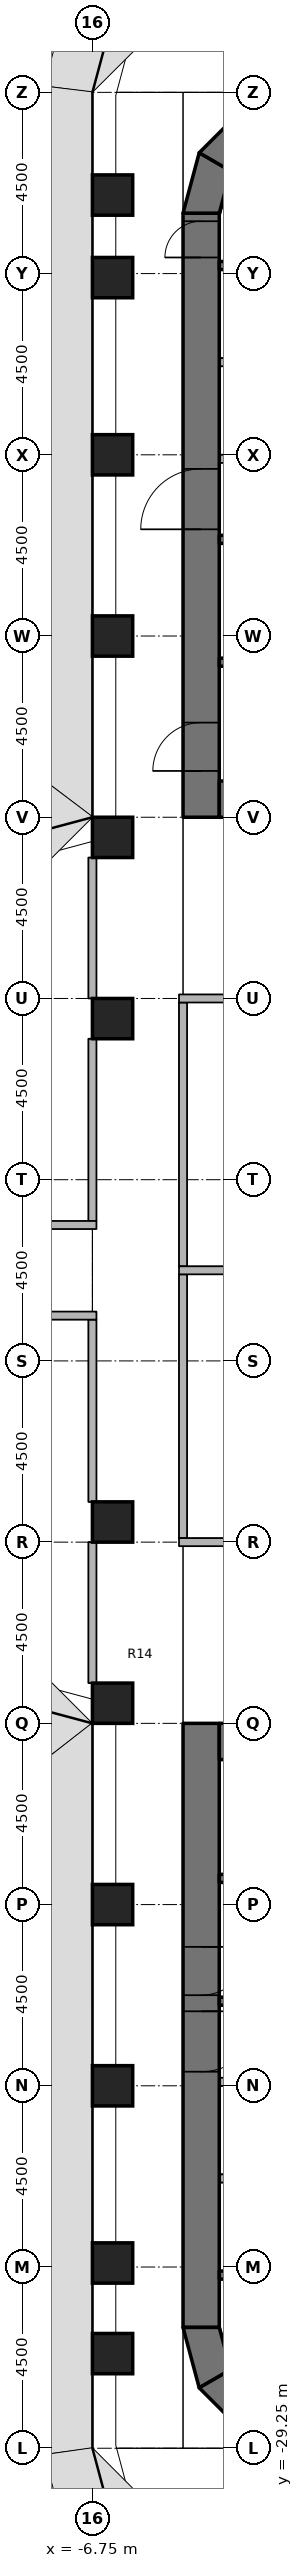
"""IFC4 building model, lengths in metres.
Left out: names, types, materials, properties, quantities, classifications, styles, units other than length and angle.
Written with IfcOpenShell. Run it as: python <this file> out.ifc"""

import sys

from ifc_helpers import new_model, si_unit, direction, frame, frame_2d, origin, origin_2d, place, context, subcontext, project, spatial, polyline, rectangle, outline, extrude, element, fill, save


model = new_model("IFC4")
c1 = context("Model", 3, precision=1e-05, world=origin(), true_north=direction((0.0, 1.0)))
c2 = subcontext(c1, "Body", "Model", "MODEL_VIEW")
j1 = project(units=[si_unit("LENGTHUNIT", "METRE"), si_unit("PLANEANGLEUNIT", "RADIAN")], contexts=[c1])
p1 = place(None, origin())
s1 = spatial("IfcSite", under=j1, at=p1, CompositionType="ELEMENT")
p2 = place(p1, origin())
s2 = spatial("IfcBuilding", under=s1, at=p2, CompositionType="ELEMENT")
p3 = place(p2, frame((0.0, 0.0, 43.8)))
s3 = spatial("IfcBuildingStorey", under=s2, at=p3, CompositionType="ELEMENT", Elevation=43.8)
for number, where, z_axis, x_axis in (
    (1, (-6.25, -26.9, 0.0), (0.0, 0.0, 1.0), (1.0, 0.0, 0.0)),
    (2, (-6.25, -24.65, 0.0), (0.0, 0.0, 1.0), (1.0, 0.0, 0.0)),
    (3, (-6.25, -20.25, 0.0), (0.0, 0.0, 1.0), (1.0, 0.0, 0.0)),
    (4, (-6.25, -15.75, 0.0), (0.0, 0.0, 1.0), (1.0, 0.0, 0.0)),
    (5, (-6.25, -10.75, 0.0), (0.0, 0.0, 1.0), (1.0, 0.0, 0.0)),
    (6, (-6.25, -6.25, 0.0), (0.0, 0.0, 1.0), (1.0, 0.0, 0.0)),
    (7, (-6.25, 6.25, 0.0), (0.0, 0.0, 1.0), (1.0, 0.0, 0.0)),
    (8, (-6.25, 10.75, 0.0), (0.0, 0.0, 1.0), (1.0, 0.0, 0.0)),
    (9, (-6.25, 15.75, 0.0), (0.0, 0.0, 1.0), (1.0, 0.0, 0.0)),
    (10, (-6.25, 20.25, 0.0), (0.0, 0.0, 1.0), (1.0, 0.0, 0.0)),
    (11, (-6.25, 24.65, 0.0), (0.0, 0.0, 1.0), (1.0, 0.0, 0.0)),
    (12, (-6.25, 26.7, 0.0), (0.0, 0.0, 1.0), (1.0, 0.0, 0.0)),
):
    element("IfcColumn", number, at=place(p3, frame(where, z_axis=z_axis, x_axis=x_axis)), inside=s3, PredefinedType="COLUMN", context=c2, shape_type="SweptSolid", body=[
        extrude(rectangle(XDim=1.0, YDim=1.0, at=origin_2d()), origin(), (0.0, 0.0, 1.0), 4.05),
    ])
p4 = place(p3, frame((-4.05, 11.25, 0.0), z_axis=(0.0, 0.0, 1.0), x_axis=(0.0, 1.0, 0.0)))
e13 = element("IfcWall", 13, at=p4, inside=s3, PredefinedType="SHEAR", context=c2, shape_type="SweptSolid", body=[
    extrude(rectangle(XDim=15.0, YDim=0.9, at=frame_2d((7.5, 0.0))), origin(), (0.0, 0.0, 1.0), 4.2),
])
p5 = place(p4, frame((7.15, 0.0, 0.0)))
e14 = element("IfcOpeningElement", 14, at=p5, cuts=e13, PredefinedType="OPENING", context=c2, shape_type="SweptSolid", body=[
    extrude(rectangle(XDim=1.5, YDim=2.3, at=frame_2d((0.75, 1.15))), frame((0.0, 0.46, 0.0), z_axis=(0.0, -1.0, 0.0), x_axis=(1.0, 0.0, 0.0)), (0.0, 0.0, 1.0), 0.92),
])
p6 = place(p4, frame((13.9, 0.0, 0.0)))
e15 = element("IfcOpeningElement", 15, at=p6, cuts=e13, PredefinedType="OPENING", context=c2, shape_type="SweptSolid", body=[
    extrude(rectangle(XDim=0.9, YDim=2.1, at=frame_2d((0.45, 1.05))), frame((0.0, 0.46, 0.0), z_axis=(0.0, -1.0, 0.0), x_axis=(1.0, 0.0, 0.0)), (0.0, 0.0, 1.0), 0.92),
])
p7 = place(p4, frame((1.15, 0.0, 0.0)))
e16 = element("IfcOpeningElement", 16, at=p7, cuts=e13, PredefinedType="OPENING", context=c2, shape_type="SweptSolid", body=[
    extrude(rectangle(XDim=1.2, YDim=2.1, at=frame_2d((0.6, 1.05))), frame((0.0, 0.46, 0.0), z_axis=(0.0, -1.0, 0.0), x_axis=(1.0, 0.0, 0.0)), (0.0, 0.0, 1.0), 0.92),
])
p8 = place(p3, frame((-3.6, 11.7, 0.0), z_axis=(0.0, 0.0, 1.0), x_axis=(1.0, 0.0, 0.0)))
e17 = element("IfcWall", 17, at=p8, inside=s3, PredefinedType="SHEAR", context=c2, shape_type="SweptSolid", body=[
    extrude(rectangle(XDim=7.2, YDim=0.9, at=frame_2d((3.6, 0.0))), origin(), (0.0, 0.0, 1.0), 4.2),
])
p9 = place(p3, origin())
e18 = element("IfcWall", 18, at=p9, inside=s3, PredefinedType="SHEAR", context=c2, shape_type="SweptSolid", body=[
    extrude(outline(polyline([(-4.5, 26.25), (-4.098, 27.75), (-3.319, 27.3), (-3.6, 26.25), (-4.5, 26.25)])), origin(), (0.0, 0.0, 1.0), 4.2),
])
p10 = place(p3, origin())
e19 = element("IfcWall", 19, at=p10, inside=s3, PredefinedType="SHEAR", context=c2, shape_type="SweptSolid", body=[
    extrude(outline(polyline([(-4.098, 27.75), (-3.0, 28.848), (-2.55, 28.069), (-3.319, 27.3), (-4.098, 27.75)])), origin(), (0.0, 0.0, 1.0), 4.2),
])
p11 = place(p3, frame((-4.05, -11.25, 0.0), z_axis=(0.0, 0.0, 1.0), x_axis=(0.0, -1.0, 0.0)))
e20 = element("IfcWall", 20, at=p11, inside=s3, PredefinedType="SHEAR", context=c2, shape_type="SweptSolid", body=[
    extrude(rectangle(XDim=15.0, YDim=0.9, at=frame_2d((7.5, 0.0))), origin(), (0.0, 0.0, 1.0), 4.2),
])
p12 = place(p11, frame((7.15, 0.0, 0.0)))
e21 = element("IfcOpeningElement", 21, at=p12, cuts=e20, PredefinedType="OPENING", context=c2, shape_type="SweptSolid", body=[
    extrude(rectangle(XDim=1.5, YDim=2.3, at=frame_2d((0.75, 1.15))), frame((0.0, 0.46, 0.0), z_axis=(0.0, -1.0, 0.0), x_axis=(1.0, 0.0, 0.0)), (0.0, 0.0, 1.0), 0.92),
])
p13 = place(p11, frame((5.55, 0.0, 0.0)))
e22 = element("IfcOpeningElement", 22, at=p13, cuts=e20, PredefinedType="OPENING", context=c2, shape_type="SweptSolid", body=[
    extrude(rectangle(XDim=1.2, YDim=2.1, at=frame_2d((0.6, 1.05))), frame((0.0, 0.46, 0.0), z_axis=(0.0, -1.0, 0.0), x_axis=(1.0, 0.0, 0.0)), (0.0, 0.0, 1.0), 0.92),
])
p14 = place(p3, frame((-3.6, -11.7, 0.0), z_axis=(0.0, 0.0, 1.0), x_axis=(1.0, 0.0, 0.0)))
e23 = element("IfcWall", 23, at=p14, inside=s3, PredefinedType="SHEAR", context=c2, shape_type="SweptSolid", body=[
    extrude(rectangle(XDim=7.2, YDim=0.9, at=frame_2d((3.6, 0.0))), origin(), (0.0, 0.0, 1.0), 4.2),
])
p15 = place(p3, origin())
e24 = element("IfcWall", 24, at=p15, inside=s3, PredefinedType="SHEAR", context=c2, shape_type="SweptSolid", body=[
    extrude(outline(polyline([(-4.5, -26.25), (-4.098, -27.75), (-3.319, -27.3), (-3.6, -26.25), (-4.5, -26.25)])), origin(), (0.0, 0.0, 1.0), 4.2),
])
p16 = place(p3, origin())
e25 = element("IfcWall", 25, at=p16, inside=s3, PredefinedType="SHEAR", context=c2, shape_type="SweptSolid", body=[
    extrude(outline(polyline([(-4.098, -27.75), (-3.0, -28.848), (-2.55, -28.069), (-3.319, -27.3), (-4.098, -27.75)])), origin(), (0.0, 0.0, 1.0), 4.2),
])
for number, where, z_axis, x_axis in (
    (26, (-3.6, 24.95, 0.0), (0.0, 0.0, 1.0), (1.0, 0.0, 0.0)),
    (27, (-3.6, 18.15, 0.0), (0.0, 0.0, 1.0), (1.0, 0.0, 0.0)),
    (28, (-3.6, 15.1, 0.0), (0.0, 0.0, 1.0), (1.0, 0.0, 0.0)),
):
    element("IfcWall", number, at=place(p3, frame(where, z_axis=z_axis, x_axis=x_axis)), inside=s3, PredefinedType="SHEAR", context=c2, shape_type="SweptSolid", body=[
        extrude(rectangle(XDim=7.2, YDim=0.2, at=frame_2d((3.6, 0.0))), origin(), (0.0, 0.0, 1.0), 4.05),
    ])
p17 = place(p3, frame((-3.6, 20.15, 0.0), z_axis=(0.0, 0.0, 1.0), x_axis=(1.0, 0.0, 0.0)))
e29 = element("IfcWall", 29, at=p17, inside=s3, PredefinedType="PARTITIONING", context=c2, shape_type="SweptSolid", body=[
    extrude(rectangle(XDim=2.7, YDim=0.2, at=frame_2d((1.35, 0.0))), origin(), (0.0, 0.0, 1.0), 4.05),
])
p18 = place(p3, frame((-3.6, 22.55, 0.0), z_axis=(0.0, 0.0, 1.0), x_axis=(1.0, 0.0, 0.0)))
e30 = element("IfcWall", 30, at=p18, inside=s3, PredefinedType="PARTITIONING", context=c2, shape_type="SweptSolid", body=[
    extrude(rectangle(XDim=2.5, YDim=0.2, at=frame_2d((1.25, 0.0))), origin(), (0.0, 0.0, 1.0), 4.05),
])
for number, where, z_axis, x_axis in (
    (31, (3.6, -24.95, 0.0), (0.0, 0.0, 1.0), (-1.0, 0.0, 0.0)),
    (32, (3.6, -18.15, 0.0), (0.0, 0.0, 1.0), (-1.0, 0.0, 0.0)),
    (33, (3.6, -15.1, 0.0), (0.0, 0.0, 1.0), (-1.0, 0.0, 0.0)),
):
    element("IfcWall", number, at=place(p3, frame(where, z_axis=z_axis, x_axis=x_axis)), inside=s3, PredefinedType="SHEAR", context=c2, shape_type="SweptSolid", body=[
        extrude(rectangle(XDim=7.2, YDim=0.2, at=frame_2d((3.6, 0.0))), origin(), (0.0, 0.0, 1.0), 4.05),
    ])
p19 = place(p3, frame((-0.9, -20.15, 0.0), z_axis=(0.0, 0.0, 1.0), x_axis=(-1.0, 0.0, 0.0)))
e34 = element("IfcWall", 34, at=p19, inside=s3, PredefinedType="PARTITIONING", context=c2, shape_type="SweptSolid", body=[
    extrude(rectangle(XDim=2.7, YDim=0.2, at=frame_2d((1.35, 0.0))), origin(), (0.0, 0.0, 1.0), 4.05),
])
p20 = place(p3, frame((-1.1, -22.55, 0.0), z_axis=(0.0, 0.0, 1.0), x_axis=(-1.0, 0.0, 0.0)))
e35 = element("IfcWall", 35, at=p20, inside=s3, PredefinedType="PARTITIONING", context=c2, shape_type="SweptSolid", body=[
    extrude(rectangle(XDim=2.5, YDim=0.2, at=frame_2d((1.25, 0.0))), origin(), (0.0, 0.0, 1.0), 4.05),
])
for number, where, z_axis, x_axis in (
    (36, (-4.5, 0.1, 0.0), (0.0, 0.0, 1.0), (0.0, 1.0, 0.0)),
    (37, (-4.5, -6.65, 0.0), (0.0, 0.0, 1.0), (0.0, 1.0, 0.0)),
):
    element("IfcWall", number, at=place(p3, frame(where, z_axis=z_axis, x_axis=x_axis)), inside=s3, PredefinedType="PARTITIONING", context=c2, shape_type="SweptSolid", body=[
        extrude(rectangle(XDim=6.55, YDim=0.2, at=frame_2d((3.275, 0.0))), origin(), (0.0, 0.0, 1.0), 3.13),
    ])
p21 = place(p3, frame((-6.75, 1.225, 0.0), z_axis=(0.0, 0.0, 1.0), x_axis=(0.0, 1.0, 0.0)))
e38 = element("IfcWall", 38, at=p21, inside=s3, PredefinedType="PARTITIONING", context=c2, shape_type="SweptSolid", body=[
    extrude(rectangle(XDim=4.525, YDim=0.2, at=frame_2d((2.262, 0.0))), origin(), (0.0, 0.0, 1.0), 3.13),
])
for number, where, z_axis, x_axis in (
    (39, (-6.75, 6.75, 0.0), (0.0, 0.0, 1.0), (0.0, 1.0, 0.0)),
    (40, (-6.75, -10.25, 0.0), (0.0, 0.0, 1.0), (0.0, 1.0, 0.0)),
):
    element("IfcWall", number, at=place(p3, frame(where, z_axis=z_axis, x_axis=x_axis)), inside=s3, PredefinedType="PARTITIONING", context=c2, shape_type="SweptSolid", body=[
        extrude(rectangle(XDim=3.5, YDim=0.2, at=frame_2d((1.75, 0.0))), origin(), (0.0, 0.0, 1.0), 3.13),
    ])
p22 = place(p3, frame((-6.75, -5.75, 0.0), z_axis=(0.0, 0.0, 1.0), x_axis=(0.0, 1.0, 0.0)))
e41 = element("IfcWall", 41, at=p22, inside=s3, PredefinedType="PARTITIONING", context=c2, shape_type="SweptSolid", body=[
    extrude(rectangle(XDim=4.525, YDim=0.2, at=frame_2d((2.262, 0.0))), origin(), (0.0, 0.0, 1.0), 3.13),
])
p23 = place(p3, frame((4.6, 6.75, 0.0), z_axis=(0.0, 0.0, 1.0), x_axis=(-1.0, 0.0, 0.0)))
e42 = element("IfcWall", 42, at=p23, inside=s3, PredefinedType="PARTITIONING", context=c2, shape_type="SweptSolid", body=[
    extrude(rectangle(XDim=9.2, YDim=0.2, at=frame_2d((4.6, 0.0))), origin(), (0.0, 0.0, 1.0), 3.13),
])
p24 = place(p23, frame((4.1, 0.0, 0.0)))
e43 = element("IfcOpeningElement", 43, at=p24, cuts=e42, PredefinedType="OPENING", context=c2, shape_type="SweptSolid", body=[
    extrude(rectangle(XDim=1.0, YDim=2.1, at=frame_2d((0.5, 1.05))), frame((0.0, 0.11, 0.0), z_axis=(0.0, -1.0, 0.0), x_axis=(1.0, 0.0, 0.0)), (0.0, 0.0, 1.0), 0.22),
])
p25 = place(p3, frame((-4.6, -6.75, 0.0), z_axis=(0.0, 0.0, 1.0), x_axis=(1.0, 0.0, 0.0)))
e44 = element("IfcWall", 44, at=p25, inside=s3, PredefinedType="PARTITIONING", context=c2, shape_type="SweptSolid", body=[
    extrude(rectangle(XDim=9.2, YDim=0.2, at=frame_2d((4.6, 0.0))), origin(), (0.0, 0.0, 1.0), 3.13),
])
p26 = place(p25, frame((4.1, 0.0, 0.0)))
e45 = element("IfcOpeningElement", 45, at=p26, cuts=e44, PredefinedType="OPENING", context=c2, shape_type="SweptSolid", body=[
    extrude(rectangle(XDim=1.0, YDim=2.1, at=frame_2d((0.5, 1.05))), frame((0.0, 0.11, 0.0), z_axis=(0.0, -1.0, 0.0), x_axis=(1.0, 0.0, 0.0)), (0.0, 0.0, 1.0), 0.22),
])
p27 = place(p3, frame((-4.6, 0.0, 0.0), z_axis=(0.0, 0.0, 1.0), x_axis=(1.0, 0.0, 0.0)))
e46 = element("IfcWall", 46, at=p27, inside=s3, PredefinedType="PARTITIONING", context=c2, shape_type="SweptSolid", body=[
    extrude(rectangle(XDim=9.2, YDim=0.2, at=frame_2d((4.6, 0.0))), origin(), (0.0, 0.0, 1.0), 3.13),
])
p28 = place(p3, frame((-11.35, 1.125, 0.0), z_axis=(0.0, 0.0, 1.0), x_axis=(1.0, 0.0, 0.0)))
e47 = element("IfcWall", 47, at=p28, inside=s3, PredefinedType="PARTITIONING", context=c2, shape_type="SweptSolid", body=[
    extrude(rectangle(XDim=4.7, YDim=0.2, at=frame_2d((2.35, 0.0))), origin(), (0.0, 0.0, 1.0), 3.13),
])
p29 = place(p28, frame((1.85, 0.0, 0.0)))
e48 = element("IfcOpeningElement", 48, at=p29, cuts=e47, PredefinedType="OPENING", context=c2, shape_type="SweptSolid", body=[
    extrude(rectangle(XDim=1.0, YDim=2.1, at=frame_2d((0.5, 1.05))), frame((0.0, 0.11, 0.0), z_axis=(0.0, -1.0, 0.0), x_axis=(1.0, 0.0, 0.0)), (0.0, 0.0, 1.0), 0.22),
])
p30 = place(p3, frame((-6.65, -1.125, 0.0), z_axis=(0.0, 0.0, 1.0), x_axis=(-1.0, 0.0, 0.0)))
e49 = element("IfcWall", 49, at=p30, inside=s3, PredefinedType="PARTITIONING", context=c2, shape_type="SweptSolid", body=[
    extrude(rectangle(XDim=4.7, YDim=0.2, at=frame_2d((2.35, 0.0))), origin(), (0.0, 0.0, 1.0), 3.13),
])
p31 = place(p30, frame((1.85, 0.0, 0.0)))
e50 = element("IfcOpeningElement", 50, at=p31, cuts=e49, PredefinedType="OPENING", context=c2, shape_type="SweptSolid", body=[
    extrude(rectangle(XDim=1.0, YDim=2.1, at=frame_2d((0.5, 1.05))), frame((0.0, 0.11, 0.0), z_axis=(0.0, -1.0, 0.0), x_axis=(1.0, 0.0, 0.0)), (0.0, 0.0, 1.0), 0.22),
])
p32 = place(p5, origin())
e51 = element("IfcDoor", 51, at=p32, inside=s3, OperationType="DOUBLE_DOOR_SINGLE_SWING", PredefinedType="DOOR", context=c2, shape_type="SweptSolid", body=[
    extrude(rectangle(XDim=1.5, YDim=2.3, at=frame_2d((0.75, 1.15))), frame((0.0, 0.025, 0.0), z_axis=(0.0, -1.0, 0.0), x_axis=(1.0, 0.0, 0.0)), (0.0, 0.0, 1.0), 0.05),
])
fill(e14, e51)
p33 = place(p6, origin())
e52 = element("IfcDoor", 52, at=p33, inside=s3, OperationType="SINGLE_SWING_LEFT", PredefinedType="DOOR", context=c2, shape_type="SweptSolid", body=[
    extrude(rectangle(XDim=0.9, YDim=2.1, at=frame_2d((0.45, 1.05))), frame((0.0, 0.025, 0.0), z_axis=(0.0, -1.0, 0.0), x_axis=(1.0, 0.0, 0.0)), (0.0, 0.0, 1.0), 0.05),
])
fill(e15, e52)
p34 = place(p7, origin())
e53 = element("IfcDoor", 53, at=p34, inside=s3, OperationType="SINGLE_SWING_LEFT", PredefinedType="DOOR", context=c2, shape_type="SweptSolid", body=[
    extrude(rectangle(XDim=1.2, YDim=2.1, at=frame_2d((0.6, 1.05))), frame((0.0, 0.025, 0.0), z_axis=(0.0, -1.0, 0.0), x_axis=(1.0, 0.0, 0.0)), (0.0, 0.0, 1.0), 0.05),
])
fill(e16, e53)
p35 = place(p12, origin())
e54 = element("IfcDoor", 54, at=p35, inside=s3, OperationType="DOUBLE_DOOR_SINGLE_SWING", PredefinedType="DOOR", context=c2, shape_type="SweptSolid", body=[
    extrude(rectangle(XDim=1.5, YDim=2.3, at=frame_2d((0.75, 1.15))), frame((0.0, 0.025, 0.0), z_axis=(0.0, -1.0, 0.0), x_axis=(1.0, 0.0, 0.0)), (0.0, 0.0, 1.0), 0.05),
])
fill(e21, e54)
p36 = place(p13, origin())
e55 = element("IfcDoor", 55, at=p36, inside=s3, OperationType="SINGLE_SWING_RIGHT", PredefinedType="DOOR", context=c2, shape_type="SweptSolid", body=[
    extrude(rectangle(XDim=1.2, YDim=2.1, at=frame_2d((0.6, 1.05))), frame((0.0, 0.025, 0.0), z_axis=(0.0, -1.0, 0.0), x_axis=(1.0, 0.0, 0.0)), (0.0, 0.0, 1.0), 0.05),
])
fill(e22, e55)
save(model, sys.argv[1])
